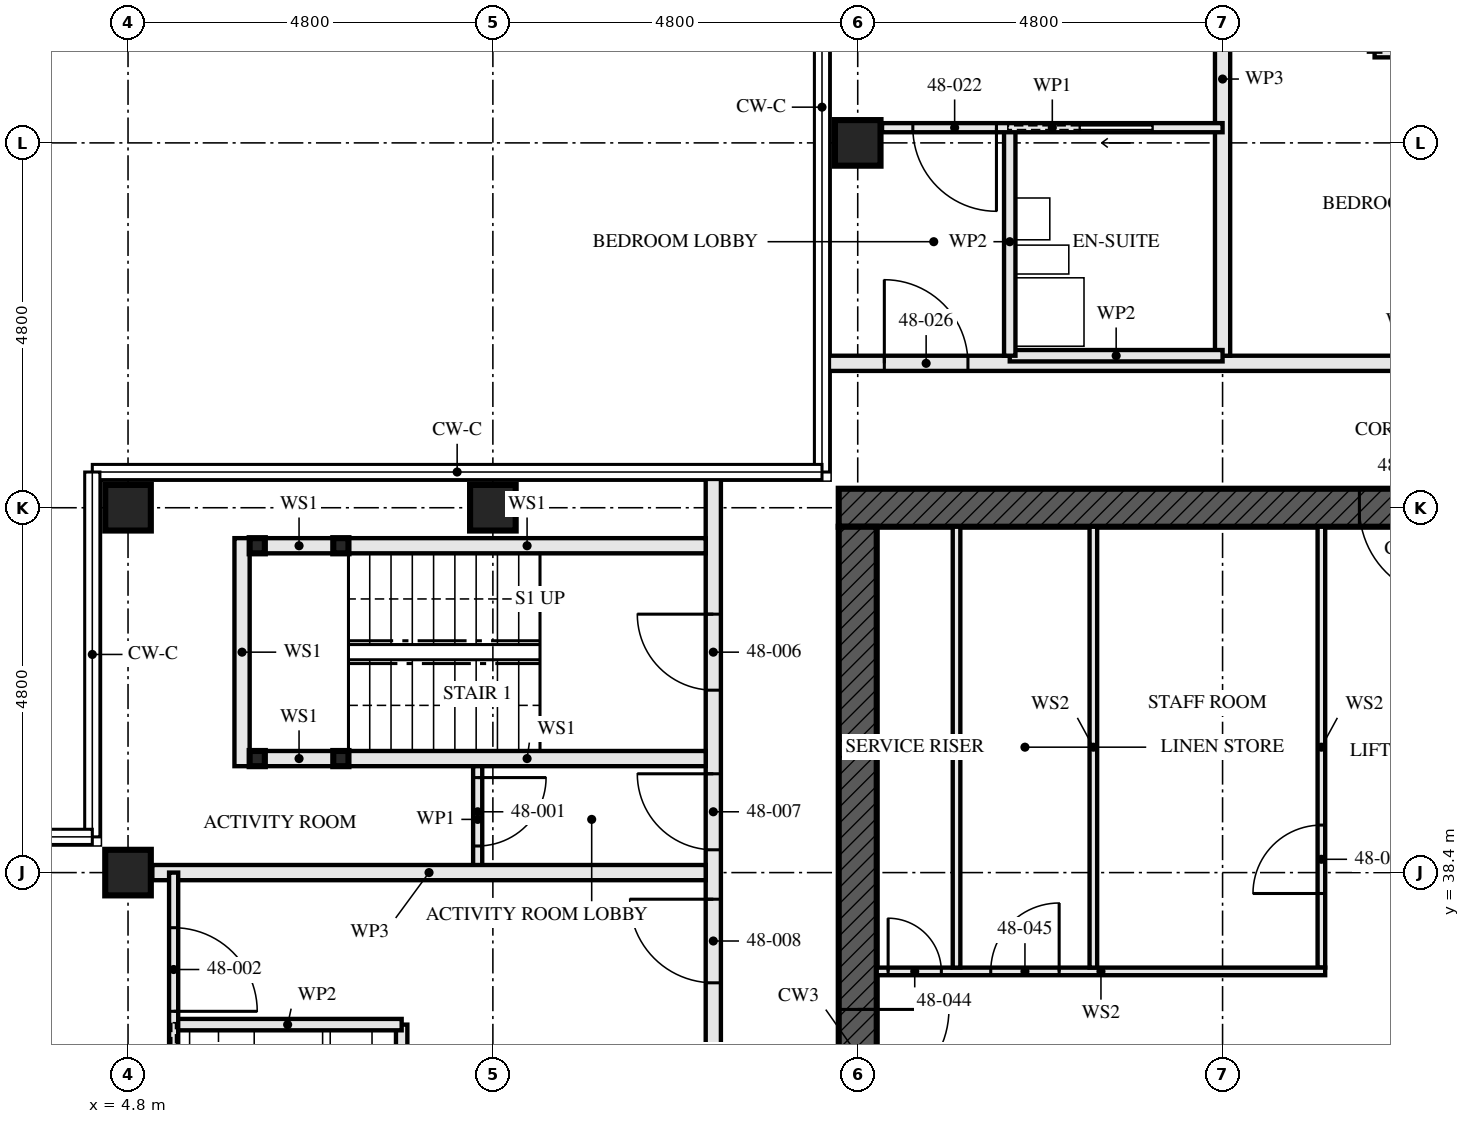
"""IFC4 building model, lengths in metres.
Left out: names, types, materials, properties, quantities, classifications, styles, units other than length and angle.
Written with IfcOpenShell. Run it as: python <this file> out.ifc"""

import sys

from ifc_helpers import new_model, si_unit, direction, frame, frame_2d, origin, origin_2d, place, context, subcontext, project, spatial, rectangle, hollow_rectangle, extrude, element, fill, save


model = new_model("IFC4")
c1 = context("Model", 3, precision=1e-05, world=origin(), true_north=direction((0.0, 1.0)))
c2 = subcontext(c1, "Body", "Model", "MODEL_VIEW")
j1 = project(units=[si_unit("LENGTHUNIT", "METRE"), si_unit("PLANEANGLEUNIT", "RADIAN")], contexts=[c1])
p1 = place(None, origin())
s1 = spatial("IfcSite", under=j1, at=p1, CompositionType="ELEMENT")
p2 = place(p1, origin())
s2 = spatial("IfcBuilding", under=s1, at=p2, CompositionType="ELEMENT")
p3 = place(p2, frame((0.0, 0.0, 176.0)))
s3 = spatial("IfcBuildingStorey", under=s2, at=p3, CompositionType="ELEMENT", Elevation=176.0)
for number, where, z_axis, x_axis in (
    (1, (4.8, 38.4, 0.0), (0.0, 0.0, 1.0), (0.0, 1.0, 0.0)),
    (2, (4.8, 43.2, 0.0), (0.0, 0.0, 1.0), (0.0, 1.0, 0.0)),
    (3, (9.6, 43.2, 0.0), (0.0, 0.0, 1.0), (0.0, 1.0, 0.0)),
    (4, (14.4, 48.0, 0.0), (0.0, 0.0, 1.0), (1.0, 0.0, 0.0)),
):
    element("IfcColumn", number, at=place(p3, frame(where, z_axis=z_axis, x_axis=x_axis)), inside=s3, PredefinedType="COLUMN", context=c2, shape_type="SweptSolid", body=[
        extrude(hollow_rectangle(XDim=0.6, YDim=0.6, WallThickness=0.08, at=origin_2d()), origin(), (0.0, 0.0, 1.0), 3.5),
    ])
p4 = place(p3, frame((29.05, 43.2, -0.17), z_axis=(0.0, 0.0, 1.0), x_axis=(-1.0, 0.0, 0.0)))
e5 = element("IfcWall", 5, at=p4, inside=s3, PredefinedType="SHEAR", context=c2, shape_type="SweptSolid", body=[
    extrude(rectangle(XDim=14.9, YDim=0.5, at=frame_2d((7.45, 0.0))), origin(), (0.0, 0.0, 1.0), 3.5),
])
p5 = place(p4, frame((6.85, 0.0, 0.17)))
e6 = element("IfcOpeningElement", 6, at=p5, cuts=e5, PredefinedType="OPENING", context=c2, shape_type="SweptSolid", body=[
    extrude(rectangle(XDim=1.2, YDim=2.1, at=frame_2d((0.6, 1.05))), frame((0.0, 0.26, 0.0), z_axis=(0.0, -1.0, 0.0), x_axis=(1.0, 0.0, 0.0)), (0.0, 0.0, 1.0), 0.521),
])
p6 = place(p3, frame((14.4, 42.95, -0.17), z_axis=(0.0, 0.0, 1.0), x_axis=(0.0, -1.0, 0.0)))
e7 = element("IfcWall", 7, at=p6, inside=s3, PredefinedType="SHEAR", context=c2, shape_type="SweptSolid", body=[
    extrude(rectangle(XDim=13.9, YDim=0.5, at=frame_2d((6.95, 0.0))), origin(), (0.0, 0.0, 1.0), 3.5),
])
p7 = place(p6, frame((6.35, 0.0, 0.17)))
e8 = element("IfcOpeningElement", 8, at=p7, cuts=e7, PredefinedType="OPENING", context=c2, shape_type="SweptSolid", body=[
    extrude(rectangle(XDim=1.2, YDim=2.1, at=frame_2d((0.6, 1.05))), frame((0.0, 0.26, 0.0), z_axis=(0.0, -1.0, 0.0), x_axis=(1.0, 0.0, 0.0)), (0.0, 0.0, 1.0), 0.521),
])
for number, where, z_axis, x_axis in (
    (9, (6.5, 42.7, 0.0), (0.0, 0.0, 1.0), (1.0, 0.0, 0.0)),
    (10, (6.5, 39.9, 0.0), (0.0, 0.0, 1.0), (1.0, 0.0, 0.0)),
    (11, (7.6, 42.7, 0.0), (0.0, 0.0, 1.0), (1.0, 0.0, 0.0)),
    (12, (7.6, 39.9, 0.0), (0.0, 0.0, 1.0), (1.0, 0.0, 0.0)),
):
    element("IfcColumn", number, at=place(p3, frame(where, z_axis=z_axis, x_axis=x_axis)), inside=s3, PredefinedType="COLUMN", context=c2, shape_type="SweptSolid", body=[
        extrude(hollow_rectangle(XDim=0.2, YDim=0.2, WallThickness=0.008, at=origin_2d()), origin(), (0.0, 0.0, 1.0), 3.33),
    ])
p8 = place(p3, frame((6.6, 42.7, 0.0), z_axis=(0.0, 0.0, 1.0), x_axis=(1.0, 0.0, 0.0)))
e13 = element("IfcWall", 13, at=p8, inside=s3, PredefinedType="SOLIDWALL", context=c2, shape_type="SweptSolid", body=[
    extrude(rectangle(XDim=0.9, YDim=0.2, at=frame_2d((0.45, 0.0))), origin(), (0.0, 0.0, 1.0), 2.99),
])
p9 = place(p3, frame((7.7, 42.7, 0.0), z_axis=(0.0, 0.0, 1.0), x_axis=(1.0, 0.0, 0.0)))
e14 = element("IfcWall", 14, at=p9, inside=s3, PredefinedType="SOLIDWALL", context=c2, shape_type="SweptSolid", body=[
    extrude(rectangle(XDim=4.7, YDim=0.2, at=frame_2d((2.35, 0.0))), origin(), (0.0, 0.0, 1.0), 2.99),
])
p10 = place(p3, frame((6.6, 39.9, 0.0), z_axis=(0.0, 0.0, 1.0), x_axis=(1.0, 0.0, 0.0)))
e15 = element("IfcWall", 15, at=p10, inside=s3, PredefinedType="SOLIDWALL", context=c2, shape_type="SweptSolid", body=[
    extrude(rectangle(XDim=0.9, YDim=0.2, at=frame_2d((0.45, 0.0))), origin(), (0.0, 0.0, 1.0), 2.99),
])
p11 = place(p3, frame((7.7, 39.9, 0.0), z_axis=(0.0, 0.0, 1.0), x_axis=(1.0, 0.0, 0.0)))
e16 = element("IfcWall", 16, at=p11, inside=s3, PredefinedType="SOLIDWALL", context=c2, shape_type="SweptSolid", body=[
    extrude(rectangle(XDim=4.7, YDim=0.2, at=frame_2d((2.35, 0.0))), origin(), (0.0, 0.0, 1.0), 2.99),
])
p12 = place(p3, frame((6.3, 42.8, 0.0), z_axis=(0.0, 0.0, 1.0), x_axis=(0.0, -1.0, 0.0)))
e17 = element("IfcWall", 17, at=p12, inside=s3, PredefinedType="SOLIDWALL", context=c2, shape_type="SweptSolid", body=[
    extrude(rectangle(XDim=3.0, YDim=0.2, at=frame_2d((1.5, 0.0))), origin(), (0.0, 0.0, 1.0), 3.33),
])
p13 = place(p3, frame((9.4, 39.8, 0.0), z_axis=(0.0, 0.0, 1.0), x_axis=(0.0, -1.0, 0.0)))
e18 = element("IfcWall", 18, at=p13, inside=s3, PredefinedType="PARTITIONING", context=c2, shape_type="SweptSolid", body=[
    extrude(rectangle(XDim=1.4, YDim=0.12, at=frame_2d((0.7, 0.0))), origin(), (0.0, 0.0, 1.0), 3.33),
])
p14 = place(p13, frame((0.15, 0.0, 0.0)))
e19 = element("IfcOpeningElement", 19, at=p14, cuts=e18, PredefinedType="OPENING", context=c2, shape_type="SweptSolid", body=[
    extrude(rectangle(XDim=0.9, YDim=2.1, at=frame_2d((0.45, 1.05))), frame((0.0, 0.071, 0.0), z_axis=(0.0, -1.0, 0.0), x_axis=(1.0, 0.0, 0.0)), (0.0, 0.0, 1.0), 0.141),
])
p15 = place(p3, frame((5.12, 38.4, 0.0), z_axis=(0.0, 0.0, 1.0), x_axis=(1.0, 0.0, 0.0)))
e20 = element("IfcWall", 20, at=p15, inside=s3, PredefinedType="PARTITIONING", context=c2, shape_type="SweptSolid", body=[
    extrude(rectangle(XDim=7.28, YDim=0.2, at=frame_2d((3.64, 0.0))), origin(), (0.0, 0.0, 1.0), 2.55),
])
p16 = place(p3, frame((5.4, 36.4, 0.0), z_axis=(0.0, 0.0, 1.0), x_axis=(1.0, 0.0, 0.0)))
e21 = element("IfcWall", 21, at=p16, inside=s3, PredefinedType="PARTITIONING", context=c2, shape_type="SweptSolid", body=[
    extrude(rectangle(XDim=3.0, YDim=0.15, at=frame_2d((1.5, 0.0))), origin(), (0.0, 0.0, 1.0), 3.33),
])
p17 = place(p3, frame((8.4, 36.4, 0.0), z_axis=(0.0, 0.0, 1.0), x_axis=(0.0, -1.0, 0.0)))
e22 = element("IfcWall", 22, at=p17, inside=s3, PredefinedType="PARTITIONING", context=c2, shape_type="SweptSolid", body=[
    extrude(rectangle(XDim=2.8, YDim=0.15, at=frame_2d((1.4, 0.0))), origin(), (0.0, 0.0, 1.0), 3.33),
])
p18 = place(p3, frame((5.4, 38.4, 0.0), z_axis=(0.0, 0.0, 1.0), x_axis=(0.0, -1.0, 0.0)))
e23 = element("IfcWall", 23, at=p18, inside=s3, PredefinedType="PARTITIONING", context=c2, shape_type="SweptSolid", body=[
    extrude(rectangle(XDim=4.8, YDim=0.12, at=frame_2d((2.4, 0.0))), origin(), (0.0, 0.0, 1.0), 3.33),
])
p19 = place(p18, frame((0.725, 0.0, 0.0)))
e24 = element("IfcOpeningElement", 24, at=p19, cuts=e23, PredefinedType="OPENING", context=c2, shape_type="SweptSolid", body=[
    extrude(rectangle(XDim=1.1, YDim=2.1, at=frame_2d((0.55, 1.05))), frame((0.0, 0.071, 0.0), z_axis=(0.0, -1.0, 0.0), x_axis=(1.0, 0.0, 0.0)), (0.0, 0.0, 1.0), 0.141),
])
p20 = place(p18, frame((2.925, 0.0, 0.0)))
e25 = element("IfcOpeningElement", 25, at=p20, cuts=e23, PredefinedType="OPENING", context=c2, shape_type="SweptSolid", body=[
    extrude(rectangle(XDim=0.95, YDim=2.1, at=frame_2d((0.475, 1.05))), frame((0.0, 0.071, 0.0), z_axis=(0.0, -1.0, 0.0), x_axis=(1.0, 0.0, 0.0)), (0.0, 0.0, 1.0), 0.141),
])
p21 = place(p3, frame((12.5, 43.65, 0.0), z_axis=(0.0, 0.0, 1.0), x_axis=(0.0, -1.0, 0.0)))
e26 = element("IfcWall", 26, at=p21, inside=s3, PredefinedType="PARTITIONING", context=c2, shape_type="SweptSolid", body=[
    extrude(rectangle(XDim=15.3, YDim=0.2, at=frame_2d((7.65, 0.0))), origin(), (0.0, 0.0, 1.0), 2.32),
])
p22 = place(p21, frame((1.85, 0.0, 0.0)))
e27 = element("IfcOpeningElement", 27, at=p22, cuts=e26, PredefinedType="OPENING", context=c2, shape_type="SweptSolid", body=[
    extrude(rectangle(XDim=1.0, YDim=2.1, at=frame_2d((0.5, 1.05))), frame((0.0, 0.111, 0.0), z_axis=(0.0, -1.0, 0.0), x_axis=(1.0, 0.0, 0.0)), (0.0, 0.0, 1.0), 0.221),
])
p23 = place(p21, frame((3.95, 0.0, 0.0)))
e28 = element("IfcOpeningElement", 28, at=p23, cuts=e26, PredefinedType="OPENING", context=c2, shape_type="SweptSolid", body=[
    extrude(rectangle(XDim=1.0, YDim=2.1, at=frame_2d((0.5, 1.05))), frame((0.0, 0.111, 0.0), z_axis=(0.0, -1.0, 0.0), x_axis=(1.0, 0.0, 0.0)), (0.0, 0.0, 1.0), 0.221),
])
p24 = place(p21, frame((5.6, 0.0, 0.0)))
e29 = element("IfcOpeningElement", 29, at=p24, cuts=e26, PredefinedType="OPENING", context=c2, shape_type="SweptSolid", body=[
    extrude(rectangle(XDim=1.1, YDim=2.1, at=frame_2d((0.55, 1.05))), frame((0.0, 0.111, 0.0), z_axis=(0.0, -1.0, 0.0), x_axis=(1.0, 0.0, 0.0)), (0.0, 0.0, 1.0), 0.221),
])
p25 = place(p21, frame((13.4, 0.0, 0.0)))
e30 = element("IfcOpeningElement", 30, at=p25, cuts=e26, PredefinedType="OPENING", context=c2, shape_type="SweptSolid", body=[
    extrude(rectangle(XDim=1.1, YDim=2.1, at=frame_2d((0.55, 1.05))), frame((0.0, 0.111, 0.0), z_axis=(0.0, -1.0, 0.0), x_axis=(1.0, 0.0, 0.0)), (0.0, 0.0, 1.0), 0.221),
])
p26 = place(p3, frame((24.0, 49.2, 0.0), z_axis=(0.0, 0.0, 1.0), x_axis=(-1.0, 0.0, 0.0)))
e31 = element("IfcWall", 31, at=p26, inside=s3, PredefinedType="PARTITIONING", context=c2, shape_type="SweptSolid", body=[
    extrude(rectangle(XDim=2.8, YDim=0.15, at=frame_2d((1.4, 0.0))), origin(), (0.0, 0.0, 1.0), 3.33),
])
p27 = place(p3, frame((19.2, 52.48, 0.0), z_axis=(0.0, 0.0, 1.0), x_axis=(0.0, -1.0, 0.0)))
e32 = element("IfcWall", 32, at=p27, inside=s3, PredefinedType="PARTITIONING", context=c2, shape_type="SweptSolid", body=[
    extrude(rectangle(XDim=7.28, YDim=0.2, at=frame_2d((3.64, 0.0))), origin(), (0.0, 0.0, 1.0), 2.55),
])
p28 = place(p3, frame((16.4, 48.2, 0.0), z_axis=(0.0, 0.0, 1.0), x_axis=(0.0, -1.0, 0.0)))
e33 = element("IfcWall", 33, at=p28, inside=s3, PredefinedType="PARTITIONING", context=c2, shape_type="SweptSolid", body=[
    extrude(rectangle(XDim=3.0, YDim=0.15, at=frame_2d((1.5, 0.0))), origin(), (0.0, 0.0, 1.0), 2.55),
])
p29 = place(p3, frame((19.2, 45.2, 0.0), z_axis=(0.0, 0.0, 1.0), x_axis=(-1.0, 0.0, 0.0)))
e34 = element("IfcWall", 34, at=p29, inside=s3, PredefinedType="PARTITIONING", context=c2, shape_type="SweptSolid", body=[
    extrude(rectangle(XDim=2.8, YDim=0.15, at=frame_2d((1.4, 0.0))), origin(), (0.0, 0.0, 1.0), 3.33),
])
p30 = place(p3, frame((19.2, 48.2, 0.0), z_axis=(0.0, 0.0, 1.0), x_axis=(-1.0, 0.0, 0.0)))
e35 = element("IfcWall", 35, at=p30, inside=s3, PredefinedType="PARTITIONING", context=c2, shape_type="SweptSolid", body=[
    extrude(rectangle(XDim=4.48, YDim=0.12, at=frame_2d((2.24, 0.0))), origin(), (0.0, 0.0, 1.0), 3.33),
])
p31 = place(p30, frame((2.975, 0.0, 0.0)))
e36 = element("IfcOpeningElement", 36, at=p31, cuts=e35, PredefinedType="OPENING", context=c2, shape_type="SweptSolid", body=[
    extrude(rectangle(XDim=1.1, YDim=2.1, at=frame_2d((0.55, 1.05))), frame((0.0, 0.071, 0.0), z_axis=(0.0, -1.0, 0.0), x_axis=(1.0, 0.0, 0.0)), (0.0, 0.0, 1.0), 0.141),
])
p32 = place(p30, frame((0.925, 0.0, 0.0)))
e37 = element("IfcOpeningElement", 37, at=p32, cuts=e35, PredefinedType="OPENING", context=c2, shape_type="SweptSolid", body=[
    extrude(rectangle(XDim=0.95, YDim=2.1, at=frame_2d((0.475, 1.05))), frame((0.0, 0.071, 0.0), z_axis=(0.0, -1.0, 0.0), x_axis=(1.0, 0.0, 0.0)), (0.0, 0.0, 1.0), 0.141),
])
p33 = place(p3, frame((29.25, 45.1, 0.0), z_axis=(0.0, 0.0, 1.0), x_axis=(-1.0, 0.0, 0.0)))
e38 = element("IfcWall", 38, at=p33, inside=s3, PredefinedType="PARTITIONING", context=c2, shape_type="SweptSolid", body=[
    extrude(rectangle(XDim=15.3, YDim=0.2, at=frame_2d((7.65, 0.0))), origin(), (0.0, 0.0, 1.0), 2.32),
])
p34 = place(p33, frame((0.8, 0.0, 0.0)))
e39 = element("IfcOpeningElement", 39, at=p34, cuts=e38, PredefinedType="OPENING", context=c2, shape_type="SweptSolid", body=[
    extrude(rectangle(XDim=1.1, YDim=2.1, at=frame_2d((0.55, 1.05))), frame((0.0, 0.111, 0.0), z_axis=(0.0, -1.0, 0.0), x_axis=(1.0, 0.0, 0.0)), (0.0, 0.0, 1.0), 0.221),
])
p35 = place(p33, frame((5.6, 0.0, 0.0)))
e40 = element("IfcOpeningElement", 40, at=p35, cuts=e38, PredefinedType="OPENING", context=c2, shape_type="SweptSolid", body=[
    extrude(rectangle(XDim=1.1, YDim=2.1, at=frame_2d((0.55, 1.05))), frame((0.0, 0.111, 0.0), z_axis=(0.0, -1.0, 0.0), x_axis=(1.0, 0.0, 0.0)), (0.0, 0.0, 1.0), 0.221),
])
p36 = place(p33, frame((13.4, 0.0, 0.0)))
e41 = element("IfcOpeningElement", 41, at=p36, cuts=e38, PredefinedType="OPENING", context=c2, shape_type="SweptSolid", body=[
    extrude(rectangle(XDim=1.1, YDim=2.1, at=frame_2d((0.55, 1.05))), frame((0.0, 0.111, 0.0), z_axis=(0.0, -1.0, 0.0), x_axis=(1.0, 0.0, 0.0)), (0.0, 0.0, 1.0), 0.221),
])
p37 = place(p3, frame((15.7, 37.15, 0.0), z_axis=(0.0, 0.0, 1.0), x_axis=(0.0, 1.0, 0.0)))
e42 = element("IfcWall", 42, at=p37, inside=s3, PredefinedType="SOLIDWALL", context=c2, shape_type="SweptSolid", body=[
    extrude(rectangle(XDim=5.8, YDim=0.1, at=frame_2d((2.9, 0.0))), origin(), (0.0, 0.0, 1.0), 3.33),
])
p38 = place(p3, frame((20.5, 37.15, 0.0), z_axis=(0.0, 0.0, 1.0), x_axis=(0.0, 1.0, 0.0)))
e43 = element("IfcWall", 43, at=p38, inside=s3, PredefinedType="SOLIDWALL", context=c2, shape_type="SweptSolid", body=[
    extrude(rectangle(XDim=5.8, YDim=0.1, at=frame_2d((2.9, 0.0))), origin(), (0.0, 0.0, 1.0), 3.33),
])
p39 = place(p38, frame((0.975, 0.0, 0.0)))
e44 = element("IfcOpeningElement", 44, at=p39, cuts=e43, PredefinedType="OPENING", context=c2, shape_type="SweptSolid", body=[
    extrude(rectangle(XDim=0.9, YDim=2.1, at=frame_2d((0.45, 1.05))), frame((0.0, 0.061, 0.0), z_axis=(0.0, -1.0, 0.0), x_axis=(1.0, 0.0, 0.0)), (0.0, 0.0, 1.0), 0.121),
])
p40 = place(p3, frame((14.65, 37.1, 0.0), z_axis=(0.0, 0.0, 1.0), x_axis=(1.0, 0.0, 0.0)))
e45 = element("IfcWall", 45, at=p40, inside=s3, PredefinedType="SOLIDWALL", context=c2, shape_type="SweptSolid", body=[
    extrude(rectangle(XDim=5.9, YDim=0.1, at=frame_2d((2.95, 0.0))), origin(), (0.0, 0.0, 1.0), 3.33),
])
p41 = place(p40, frame((0.15, 0.0, 0.0)))
e46 = element("IfcOpeningElement", 46, at=p41, cuts=e45, PredefinedType="OPENING", context=c2, shape_type="SweptSolid", body=[
    extrude(rectangle(XDim=0.7, YDim=2.1, at=frame_2d((0.35, 1.05))), frame((0.0, 0.061, 0.0), z_axis=(0.0, -1.0, 0.0), x_axis=(1.0, 0.0, 0.0)), (0.0, 0.0, 1.0), 0.121),
])
p42 = place(p40, frame((1.5, 0.0, 0.0)))
e47 = element("IfcOpeningElement", 47, at=p42, cuts=e45, PredefinedType="OPENING", context=c2, shape_type="SweptSolid", body=[
    extrude(rectangle(XDim=0.9, YDim=2.1, at=frame_2d((0.45, 1.05))), frame((0.0, 0.061, 0.0), z_axis=(0.0, -1.0, 0.0), x_axis=(1.0, 0.0, 0.0)), (0.0, 0.0, 1.0), 0.121),
])
p43 = place(p3, frame((17.5, 37.15, 0.0), z_axis=(0.0, 0.0, 1.0), x_axis=(0.0, 1.0, 0.0)))
e48 = element("IfcWall", 48, at=p43, inside=s3, PredefinedType="SOLIDWALL", context=c2, shape_type="SweptSolid", body=[
    extrude(rectangle(XDim=5.8, YDim=0.1, at=frame_2d((2.9, 0.0))), origin(), (0.0, 0.0, 1.0), 3.33),
])
p44 = place(p14, origin())
e49 = element("IfcDoor", 49, at=p44, inside=s3, OperationType="SINGLE_SWING_RIGHT", PredefinedType="DOOR", context=c2, shape_type="SweptSolid", body=[
    extrude(rectangle(XDim=0.9, YDim=2.1, at=frame_2d((0.45, 1.05))), frame((0.0, 0.022, 0.0), z_axis=(0.0, -1.0, 0.0), x_axis=(1.0, 0.0, 0.0)), (0.0, 0.0, 1.0), 0.044),
])
fill(e19, e49)
p45 = place(p19, origin())
e50 = element("IfcDoor", 50, at=p45, inside=s3, OperationType="SINGLE_SWING_LEFT", PredefinedType="DOOR", context=c2, shape_type="SweptSolid", body=[
    extrude(rectangle(XDim=1.1, YDim=2.1, at=frame_2d((0.55, 1.05))), frame((0.0, 0.022, 0.0), z_axis=(0.0, -1.0, 0.0), x_axis=(1.0, 0.0, 0.0)), (0.0, 0.0, 1.0), 0.044),
])
fill(e24, e50)
p46 = place(p22, frame((1.0, 0.0, 0.0), z_axis=(0.0, 0.0, 1.0), x_axis=(-1.0, 0.0, 0.0)))
e51 = element("IfcDoor", 51, at=p46, inside=s3, OperationType="SINGLE_SWING_LEFT", PredefinedType="DOOR", context=c2, shape_type="SweptSolid", body=[
    extrude(rectangle(XDim=1.0, YDim=2.1, at=frame_2d((0.5, 1.05))), frame((0.0, 0.032, 0.0), z_axis=(0.0, -1.0, 0.0), x_axis=(1.0, 0.0, 0.0)), (0.0, 0.0, 1.0), 0.064),
])
fill(e27, e51)
p47 = place(p23, frame((1.0, 0.0, 0.0), z_axis=(0.0, 0.0, 1.0), x_axis=(-1.0, 0.0, 0.0)))
e52 = element("IfcDoor", 52, at=p47, inside=s3, OperationType="SINGLE_SWING_LEFT", PredefinedType="DOOR", context=c2, shape_type="SweptSolid", body=[
    extrude(rectangle(XDim=1.0, YDim=2.1, at=frame_2d((0.5, 1.05))), frame((0.0, 0.027, 0.0), z_axis=(0.0, -1.0, 0.0), x_axis=(1.0, 0.0, 0.0)), (0.0, 0.0, 1.0), 0.054),
])
fill(e28, e52)
p48 = place(p24, frame((1.1, 0.0, 0.0), z_axis=(0.0, 0.0, 1.0), x_axis=(-1.0, 0.0, 0.0)))
e53 = element("IfcDoor", 53, at=p48, inside=s3, OperationType="SINGLE_SWING_LEFT", PredefinedType="DOOR", context=c2, shape_type="SweptSolid", body=[
    extrude(rectangle(XDim=1.1, YDim=2.1, at=frame_2d((0.55, 1.05))), frame((0.0, 0.027, 0.0), z_axis=(0.0, -1.0, 0.0), x_axis=(1.0, 0.0, 0.0)), (0.0, 0.0, 1.0), 0.054),
])
fill(e29, e53)
p49 = place(p31, origin())
e54 = element("IfcDoor", 54, at=p49, inside=s3, OperationType="SINGLE_SWING_RIGHT", PredefinedType="DOOR", context=c2, shape_type="SweptSolid", body=[
    extrude(rectangle(XDim=1.1, YDim=2.1, at=frame_2d((0.55, 1.05))), frame((0.0, 0.022, 0.0), z_axis=(0.0, -1.0, 0.0), x_axis=(1.0, 0.0, 0.0)), (0.0, 0.0, 1.0), 0.044),
])
fill(e36, e54)
p50 = place(p32, origin())
e55 = element("IfcDoor", 55, at=p50, inside=s3, OperationType="SLIDING_TO_LEFT", PredefinedType="DOOR", context=c2, shape_type="SweptSolid", body=[
    extrude(rectangle(XDim=0.95, YDim=2.1, at=frame_2d((0.475, 1.05))), frame((0.0, 0.022, 0.0), z_axis=(0.0, -1.0, 0.0), x_axis=(1.0, 0.0, 0.0)), (0.0, 0.0, 1.0), 0.044),
])
fill(e37, e55)
p51 = place(p36, frame((1.1, 0.0, 0.0), z_axis=(0.0, 0.0, 1.0), x_axis=(-1.0, 0.0, 0.0)))
e56 = element("IfcDoor", 56, at=p51, inside=s3, OperationType="SINGLE_SWING_RIGHT", PredefinedType="DOOR", context=c2, shape_type="SweptSolid", body=[
    extrude(rectangle(XDim=1.1, YDim=2.1, at=frame_2d((0.55, 1.05))), frame((0.0, 0.027, 0.0), z_axis=(0.0, -1.0, 0.0), x_axis=(1.0, 0.0, 0.0)), (0.0, 0.0, 1.0), 0.054),
])
fill(e41, e56)
p52 = place(p39, origin())
e57 = element("IfcDoor", 57, at=p52, inside=s3, OperationType="SINGLE_SWING_RIGHT", PredefinedType="DOOR", context=c2, shape_type="SweptSolid", body=[
    extrude(rectangle(XDim=0.9, YDim=2.1, at=frame_2d((0.45, 1.05))), frame((0.0, 0.027, 0.0), z_axis=(0.0, -1.0, 0.0), x_axis=(1.0, 0.0, 0.0)), (0.0, 0.0, 1.0), 0.054),
])
fill(e44, e57)
p53 = place(p41, origin())
e58 = element("IfcDoor", 58, at=p53, inside=s3, OperationType="SINGLE_SWING_RIGHT", PredefinedType="DOOR", context=c2, shape_type="SweptSolid", body=[
    extrude(rectangle(XDim=0.7, YDim=2.1, at=frame_2d((0.35, 1.05))), frame((0.0, 0.027, 0.0), z_axis=(0.0, -1.0, 0.0), x_axis=(1.0, 0.0, 0.0)), (0.0, 0.0, 1.0), 0.054),
])
fill(e46, e58)
p54 = place(p42, origin())
e59 = element("IfcDoor", 59, at=p54, inside=s3, OperationType="SINGLE_SWING_LEFT", PredefinedType="DOOR", context=c2, shape_type="SweptSolid", body=[
    extrude(rectangle(XDim=0.9, YDim=2.1, at=frame_2d((0.45, 1.05))), frame((0.0, 0.027, 0.0), z_axis=(0.0, -1.0, 0.0), x_axis=(1.0, 0.0, 0.0)), (0.0, 0.0, 1.0), 0.054),
])
fill(e47, e59)
p55 = place(p7, origin())
e60 = element("IfcDoor", 60, at=p55, inside=s3, OperationType="SINGLE_SWING_LEFT", PredefinedType="DOOR", context=c2, shape_type="SweptSolid", body=[
    extrude(rectangle(XDim=1.2, YDim=2.1, at=frame_2d((0.6, 1.05))), frame((0.0, 0.027, 0.0), z_axis=(0.0, -1.0, 0.0), x_axis=(1.0, 0.0, 0.0)), (0.0, 0.0, 1.0), 0.054),
])
fill(e8, e60)
p56 = place(p5, origin())
e61 = element("IfcDoor", 61, at=p56, inside=s3, OperationType="SINGLE_SWING_LEFT", PredefinedType="DOOR", context=c2, shape_type="SweptSolid", body=[
    extrude(rectangle(XDim=1.2, YDim=2.1, at=frame_2d((0.6, 1.05))), frame((0.0, 0.027, 0.0), z_axis=(0.0, -1.0, 0.0), x_axis=(1.0, 0.0, 0.0)), (0.0, 0.0, 1.0), 0.054),
])
fill(e6, e61)
save(model, sys.argv[1])
